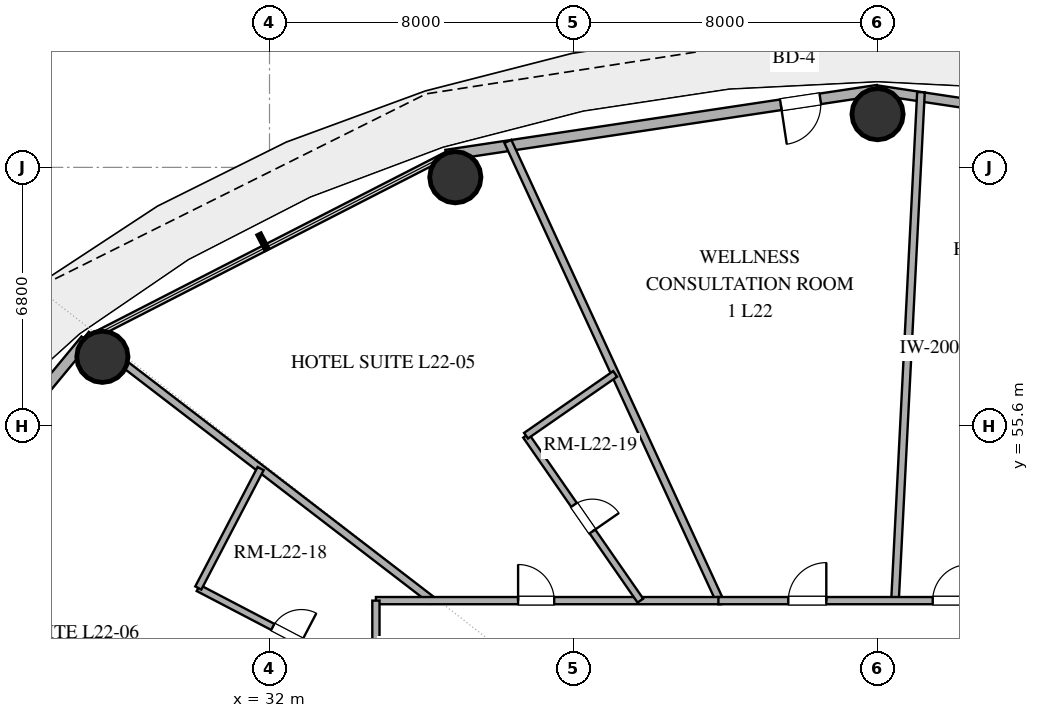
"""IFC4 building model, lengths in metres.
Left out: names, types, materials, properties, quantities, classifications, styles, units other than length and angle.
Written with IfcOpenShell. Run it as: python <this file> out.ifc"""

import sys

from ifc_helpers import new_model, si_unit, direction, frame, frame_2d, origin, origin_2d, place, context, subcontext, project, spatial, rectangle, hollow_circle, extrude, element, fill, save


model = new_model("IFC4")
c1 = context("Model", 3, precision=1e-05, world=origin(), true_north=direction((0.0, 1.0)))
c2 = subcontext(c1, "Body", "Model", "MODEL_VIEW")
j1 = project(units=[si_unit("LENGTHUNIT", "METRE"), si_unit("PLANEANGLEUNIT", "RADIAN")], contexts=[c1])
p1 = place(None, origin())
s1 = spatial("IfcSite", under=j1, at=p1, CompositionType="ELEMENT")
p2 = place(p1, origin())
s2 = spatial("IfcBuilding", under=s1, at=p2, CompositionType="ELEMENT")
p3 = place(p2, frame((0.0, 0.0, 91.2)))
s3 = spatial("IfcBuildingStorey", under=s2, at=p3, CompositionType="ELEMENT", Elevation=91.2)
for number, where, z_axis, x_axis in (
    (1, (48.0, 63.8, 0.0), (0.0, 0.0, 1.0), (1.0, 0.0, 0.0)),
    (2, (36.89, 62.141, 0.0), (0.0, 0.0, 1.0), (1.0, 0.0, 0.0)),
    (3, (27.602, 57.415, 0.0), (0.0, 0.0, 1.0), (1.0, 0.0, 0.0)),
):
    element("IfcColumn", number, at=place(p3, frame(where, z_axis=z_axis, x_axis=x_axis)), inside=s3, PredefinedType="COLUMN", context=c2, shape_type="SweptSolid", body=[
        extrude(hollow_circle(Radius=0.675, WallThickness=0.036, at=origin_2d()), origin(), (0.0, 0.0, 1.0), 3.38),
    ])
p4 = place(p3, frame((59.351, 62.723, 0.0), z_axis=(0.0, 0.0, 1.0), x_axis=(-0.988877774656, 0.148730450117, 0.0)))
e4 = element("IfcWall", 4, at=p4, inside=s3, PredefinedType="SOLIDWALL", context=c2, shape_type="SweptSolid", body=[
    extrude(rectangle(XDim=11.479, YDim=0.25, at=frame_2d((5.74, 0.0))), origin(), (0.0, 0.0, 1.0), 3.38),
])
p5 = place(p4, frame((1.231, 0.0, 1.42)))
e5 = element("IfcOpeningElement", 5, at=p5, cuts=e4, PredefinedType="OPENING", context=c2, shape_type="SweptSolid", body=[
    extrude(rectangle(XDim=1.0, YDim=1.05, at=frame_2d((0.5, 0.525))), frame((0.0, 0.135, 0.0), z_axis=(0.0, -1.0, 0.0), x_axis=(1.0, 0.0, 0.0)), (0.0, 0.0, 1.0), 0.27),
])
p6 = place(p3, frame((48.0, 64.43, 0.0), z_axis=(0.0, 0.0, 1.0), x_axis=(-0.988877774656, -0.148730450117, 0.0)))
e6 = element("IfcWall", 6, at=p6, inside=s3, PredefinedType="SOLIDWALL", context=c2, shape_type="SweptSolid", body=[
    extrude(rectangle(XDim=11.479, YDim=0.28, at=frame_2d((5.74, 0.0))), origin(), (0.0, 0.0, 1.0), 3.38),
])
p7 = place(p6, frame((1.524, 0.0, 0.0)))
e7 = element("IfcOpeningElement", 7, at=p7, cuts=e6, PredefinedType="OPENING", context=c2, shape_type="SweptSolid", body=[
    extrude(rectangle(XDim=1.05, YDim=2.2, at=frame_2d((0.525, 1.1))), frame((0.0, 0.15, 0.0), z_axis=(0.0, -1.0, 0.0), x_axis=(1.0, 0.0, 0.0)), (0.0, 0.0, 1.0), 0.3),
])
p8 = place(p3, frame((27.16, 57.86, 0.0), z_axis=(0.0, 0.0, 1.0), x_axis=(-0.637505817448, -0.770445541696, 0.0)))
e8 = element("IfcWall", 8, at=p8, inside=s3, PredefinedType="SOLIDWALL", context=c2, shape_type="SweptSolid", body=[
    extrude(rectangle(XDim=9.445, YDim=0.28, at=frame_2d((4.723, 0.0))), origin(), (0.0, 0.0, 1.0), 3.38),
])
p9 = place(p8, frame((2.697, 0.0, 0.85)))
e9 = element("IfcOpeningElement", 9, at=p9, cuts=e8, PredefinedType="OPENING", context=c2, shape_type="SweptSolid", body=[
    extrude(rectangle(XDim=1.35, YDim=1.8, at=frame_2d((0.675, 0.9))), frame((0.0, 0.15, 0.0), z_axis=(0.0, -1.0, 0.0), x_axis=(1.0, 0.0, 0.0)), (0.0, 0.0, 1.0), 0.3),
])
p10 = place(p8, frame((5.282, 0.0, 0.85)))
e10 = element("IfcOpeningElement", 10, at=p10, cuts=e8, PredefinedType="OPENING", context=c2, shape_type="SweptSolid", body=[
    extrude(rectangle(XDim=1.35, YDim=1.8, at=frame_2d((0.675, 0.9))), frame((0.0, 0.15, 0.0), z_axis=(0.0, -1.0, 0.0), x_axis=(1.0, 0.0, 0.0)), (0.0, 0.0, 1.0), 0.3),
])
p11 = place(p3, frame((49.143, 64.379, 0.0), z_axis=(0.0, 0.0, 1.0), x_axis=(-0.050973793346, -0.998699991185, 0.0)))
e11 = element("IfcWall", 11, at=p11, inside=s3, PredefinedType="PARTITIONING", context=c2, shape_type="SweptSolid", body=[
    extrude(rectangle(XDim=13.396, YDim=0.2, at=frame_2d((6.698, 0.0))), origin(), (0.0, 0.0, 1.0), 2.74),
])
p12 = place(p3, frame((43.847, 51.0, 0.0), z_axis=(0.0, 0.0, 1.0), x_axis=(-0.418953467184, 0.908007704997, 0.0)))
e12 = element("IfcWall", 12, at=p12, inside=s3, PredefinedType="PARTITIONING", context=c2, shape_type="SweptSolid", body=[
    extrude(rectangle(XDim=13.307, YDim=0.2, at=frame_2d((6.654, 0.0))), origin(), (0.0, 0.0, 1.0), 2.74),
])
p13 = place(p3, frame((36.287, 51.0, 0.0), z_axis=(0.0, 0.0, 1.0), x_axis=(-0.792955910196, 0.609279020224, 0.0)))
e13 = element("IfcWall", 13, at=p13, inside=s3, PredefinedType="PARTITIONING", context=c2, shape_type="SweptSolid", body=[
    extrude(rectangle(XDim=11.48, YDim=0.2, at=frame_2d((5.74, 0.0))), origin(), (0.0, 0.0, 1.0), 2.74),
])
p14 = place(p3, frame((34.8, 51.0, 0.0), z_axis=(0.0, 0.0, 1.0), x_axis=(1.0, 0.0, 0.0)))
e14 = element("IfcWall", 14, at=p14, inside=s3, PredefinedType="PARTITIONING", context=c2, shape_type="SweptSolid", body=[
    extrude(rectangle(XDim=9.083, YDim=0.19, at=frame_2d((4.541, 0.0))), origin(), (0.0, 0.0, 1.0), 2.74),
])
p15 = place(p14, frame((3.741, 0.0, 0.0)))
e15 = element("IfcOpeningElement", 15, at=p15, cuts=e14, PredefinedType="OPENING", context=c2, shape_type="SweptSolid", body=[
    extrude(rectangle(XDim=0.95, YDim=2.15, at=frame_2d((0.475, 1.075))), frame((0.0, 0.105, 0.0), z_axis=(0.0, -1.0, 0.0), x_axis=(1.0, 0.0, 0.0)), (0.0, 0.0, 1.0), 0.21),
])
p16 = place(p3, frame((38.75, 55.34, 0.0), z_axis=(0.0, 0.0, 1.0), x_axis=(0.569842064311, -0.821754234393, 0.0)))
e16 = element("IfcWall", 16, at=p16, inside=s3, PredefinedType="PLUMBINGWALL", context=c2, shape_type="SweptSolid", body=[
    extrude(rectangle(XDim=5.281, YDim=0.18, at=frame_2d((2.641, 0.0))), origin(), (0.0, 0.0, 1.0), 2.74),
])
p17 = place(p16, frame((2.215, 0.0, 0.0)))
e17 = element("IfcOpeningElement", 17, at=p17, cuts=e16, PredefinedType="OPENING", context=c2, shape_type="SweptSolid", body=[
    extrude(rectangle(XDim=0.85, YDim=2.1, at=frame_2d((0.425, 1.05))), frame((0.0, 0.1, 0.0), z_axis=(0.0, -1.0, 0.0), x_axis=(1.0, 0.0, 0.0)), (0.0, 0.0, 1.0), 0.2),
])
p18 = place(p3, frame((30.126, 51.332, 0.0), z_axis=(0.0, 0.0, 1.0), x_axis=(0.886465103711, -0.462795440668, 0.0)))
e18 = element("IfcWall", 18, at=p18, inside=s3, PredefinedType="PLUMBINGWALL", context=c2, shape_type="SweptSolid", body=[
    extrude(rectangle(XDim=5.273, YDim=0.18, at=frame_2d((2.636, 0.0))), origin(), (0.0, 0.0, 1.0), 2.74),
])
p19 = place(p18, frame((2.211, 0.0, 0.0)))
e19 = element("IfcOpeningElement", 19, at=p19, cuts=e18, PredefinedType="OPENING", context=c2, shape_type="SweptSolid", body=[
    extrude(rectangle(XDim=0.85, YDim=2.1, at=frame_2d((0.425, 1.05))), frame((0.0, 0.1, 0.0), z_axis=(0.0, -1.0, 0.0), x_axis=(1.0, 0.0, 0.0)), (0.0, 0.0, 1.0), 0.2),
])
p20 = place(p3, frame((43.812, 51.0, 0.0), z_axis=(0.0, 0.0, 1.0), x_axis=(1.0, 0.0, 0.0)))
e20 = element("IfcWall", 20, at=p20, inside=s3, PredefinedType="PARTITIONING", context=c2, shape_type="SweptSolid", body=[
    extrude(rectangle(XDim=7.613, YDim=0.19, at=frame_2d((3.807, 0.0))), origin(), (0.0, 0.0, 1.0), 2.74),
])
p21 = place(p20, frame((1.84, 0.0, 0.0)))
e21 = element("IfcOpeningElement", 21, at=p21, cuts=e20, PredefinedType="OPENING", context=c2, shape_type="SweptSolid", body=[
    extrude(rectangle(XDim=1.0, YDim=2.2, at=frame_2d((0.5, 1.1))), frame((0.0, 0.105, 0.0), z_axis=(0.0, -1.0, 0.0), x_axis=(1.0, 0.0, 0.0)), (0.0, 0.0, 1.0), 0.21),
])
p22 = place(p20, frame((5.639, 0.0, 0.0)))
e22 = element("IfcOpeningElement", 22, at=p22, cuts=e20, PredefinedType="OPENING", context=c2, shape_type="SweptSolid", body=[
    extrude(rectangle(XDim=0.95, YDim=2.15, at=frame_2d((0.475, 1.075))), frame((0.0, 0.105, 0.0), z_axis=(0.0, -1.0, 0.0), x_axis=(1.0, 0.0, 0.0)), (0.0, 0.0, 1.0), 0.21),
])
p23 = place(p3, frame((34.8, 41.94, 0.0), z_axis=(0.0, 0.0, 1.0), x_axis=(0.0, 1.0, 0.0)))
e23 = element("IfcWall", 23, at=p23, inside=s3, PredefinedType="PARTITIONING", context=c2, shape_type="SweptSolid", body=[
    extrude(rectangle(XDim=9.06, YDim=0.19, at=frame_2d((4.53, 0.0))), origin(), (0.0, 0.0, 1.0), 2.74),
])
p24 = place(p23, frame((4.179, 0.0, 0.0)))
e24 = element("IfcOpeningElement", 24, at=p24, cuts=e23, PredefinedType="OPENING", context=c2, shape_type="SweptSolid", body=[
    extrude(rectangle(XDim=0.95, YDim=2.15, at=frame_2d((0.475, 1.075))), frame((0.0, 0.105, 0.0), z_axis=(0.0, -1.0, 0.0), x_axis=(1.0, 0.0, 0.0)), (0.0, 0.0, 1.0), 0.21),
])
p25 = place(p3, frame((31.766, 54.474, 0.0), z_axis=(0.0, 0.0, 1.0), x_axis=(-0.462822582901, -0.886450933079, 0.0)))
e25 = element("IfcWall", 25, at=p25, inside=s3, PredefinedType="PLUMBINGWALL", context=c2, shape_type="SweptSolid", body=[
    extrude(rectangle(XDim=3.544, YDim=0.18, at=frame_2d((1.772, 0.0))), origin(), (0.0, 0.0, 1.0), 2.74),
])
p26 = place(p3, frame((41.095, 56.965, 0.0), z_axis=(0.0, 0.0, 1.0), x_axis=(-0.821788449593, -0.569792720308, 0.0)))
e26 = element("IfcWall", 26, at=p26, inside=s3, PredefinedType="PLUMBINGWALL", context=c2, shape_type="SweptSolid", body=[
    extrude(rectangle(XDim=2.853, YDim=0.18, at=frame_2d((1.427, 0.0))), origin(), (0.0, 0.0, 1.0), 2.74),
])
p27 = place(p7, origin())
e27 = element("IfcDoor", 27, at=p27, inside=s3, OperationType="SINGLE_SWING_RIGHT", PredefinedType="DOOR", context=c2, shape_type="SweptSolid", body=[
    extrude(rectangle(XDim=1.05, YDim=2.2, at=frame_2d((0.525, 1.1))), frame((0.0, 0.025, 0.0), z_axis=(0.0, -1.0, 0.0), x_axis=(1.0, 0.0, 0.0)), (0.0, 0.0, 1.0), 0.05),
])
fill(e7, e27)
p28 = place(p15, origin())
e28 = element("IfcDoor", 28, at=p28, inside=s3, OperationType="SINGLE_SWING_LEFT", PredefinedType="DOOR", context=c2, shape_type="SweptSolid", body=[
    extrude(rectangle(XDim=0.95, YDim=2.15, at=frame_2d((0.475, 1.075))), frame((0.0, 0.025, 0.0), z_axis=(0.0, -1.0, 0.0), x_axis=(1.0, 0.0, 0.0)), (0.0, 0.0, 1.0), 0.05),
])
fill(e15, e28)
p29 = place(p17, origin())
e29 = element("IfcDoor", 29, at=p29, inside=s3, OperationType="SINGLE_SWING_RIGHT", PredefinedType="DOOR", context=c2, shape_type="SweptSolid", body=[
    extrude(rectangle(XDim=0.85, YDim=2.1, at=frame_2d((0.425, 1.05))), frame((0.0, 0.025, 0.0), z_axis=(0.0, -1.0, 0.0), x_axis=(1.0, 0.0, 0.0)), (0.0, 0.0, 1.0), 0.05),
])
fill(e17, e29)
p30 = place(p19, origin())
e30 = element("IfcDoor", 30, at=p30, inside=s3, OperationType="SINGLE_SWING_RIGHT", PredefinedType="DOOR", context=c2, shape_type="SweptSolid", body=[
    extrude(rectangle(XDim=0.85, YDim=2.1, at=frame_2d((0.425, 1.05))), frame((0.0, 0.025, 0.0), z_axis=(0.0, -1.0, 0.0), x_axis=(1.0, 0.0, 0.0)), (0.0, 0.0, 1.0), 0.05),
])
fill(e19, e30)
p31 = place(p21, origin())
e31 = element("IfcDoor", 31, at=p31, inside=s3, OperationType="SINGLE_SWING_RIGHT", PredefinedType="DOOR", context=c2, shape_type="SweptSolid", body=[
    extrude(rectangle(XDim=1.0, YDim=2.2, at=frame_2d((0.5, 1.1))), frame((0.0, 0.025, 0.0), z_axis=(0.0, -1.0, 0.0), x_axis=(1.0, 0.0, 0.0)), (0.0, 0.0, 1.0), 0.05),
])
fill(e21, e31)
p32 = place(p22, origin())
e32 = element("IfcDoor", 32, at=p32, inside=s3, OperationType="SINGLE_SWING_RIGHT", PredefinedType="DOOR", context=c2, shape_type="SweptSolid", body=[
    extrude(rectangle(XDim=0.95, YDim=2.15, at=frame_2d((0.475, 1.075))), frame((0.0, 0.025, 0.0), z_axis=(0.0, -1.0, 0.0), x_axis=(1.0, 0.0, 0.0)), (0.0, 0.0, 1.0), 0.05),
])
fill(e22, e32)
save(model, sys.argv[1])
